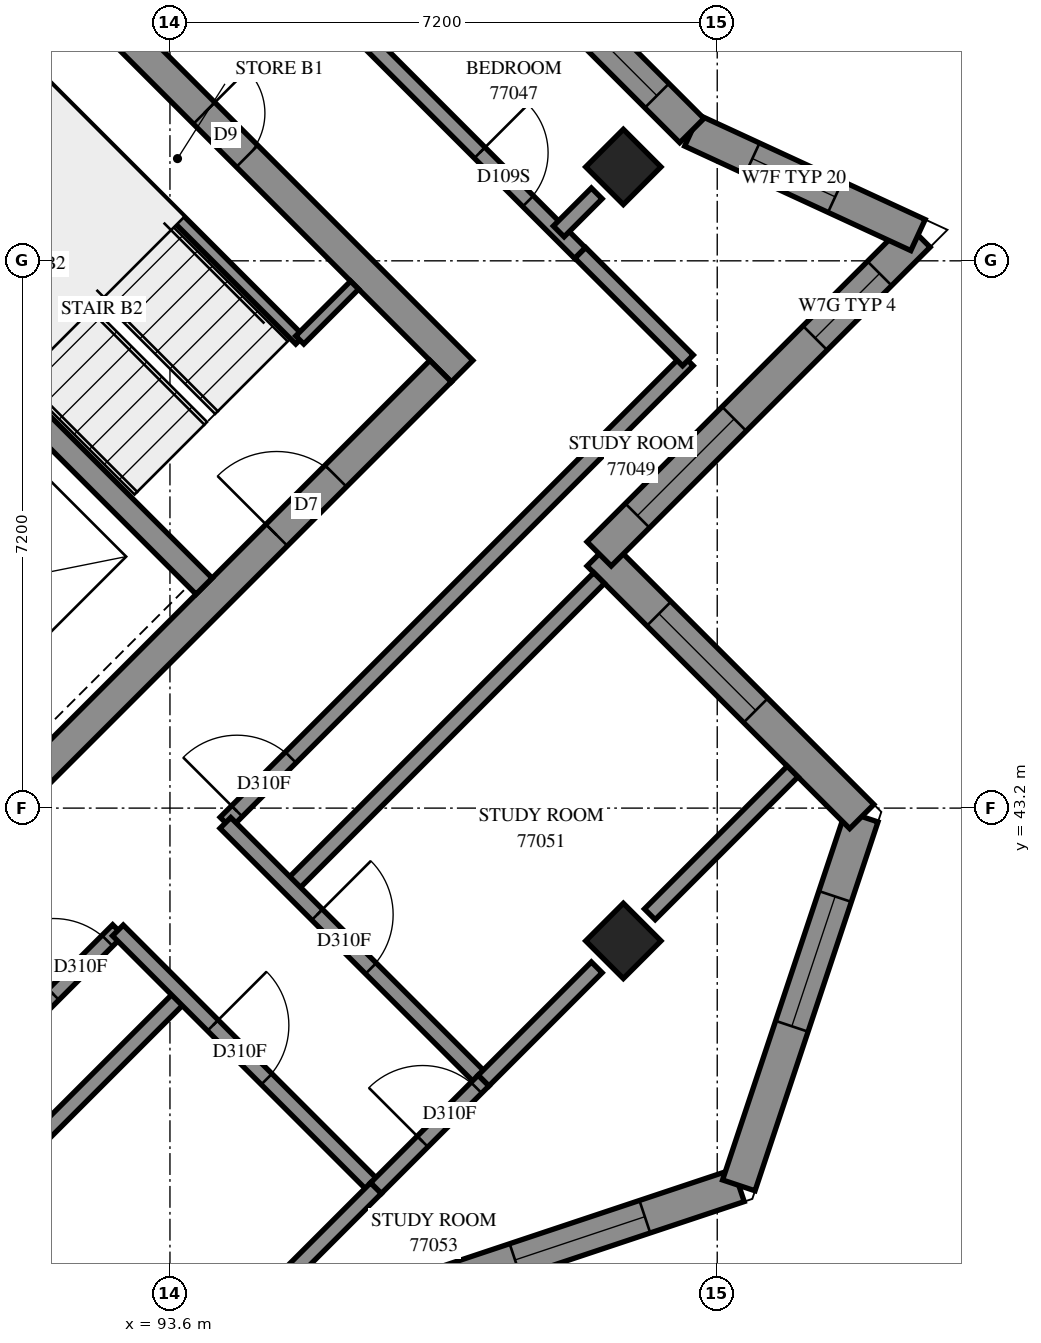
"""IFC4 building model, lengths in metres.
Left out: names, types, materials, properties, quantities, classifications, styles, units other than length and angle.
Written with IfcOpenShell. Run it as: python <this file> out.ifc"""

import sys

from ifc_helpers import new_model, si_unit, direction, frame, frame_2d, origin, origin_2d, place, context, subcontext, project, spatial, polyline, rectangle, outline, extrude, element, fill, save


model = new_model("IFC4")
c1 = context("Model", 3, precision=1e-05, world=origin(), true_north=direction((0.0, 1.0)))
c2 = subcontext(c1, "Body", "Model", "MODEL_VIEW")
j1 = project(units=[si_unit("LENGTHUNIT", "METRE"), si_unit("PLANEANGLEUNIT", "RADIAN")], contexts=[c1])
p1 = place(None, origin())
s1 = spatial("IfcSite", under=j1, at=p1, CompositionType="ELEMENT")
p2 = place(p1, origin())
s2 = spatial("IfcBuilding", under=s1, at=p2, CompositionType="ELEMENT")
p3 = place(p2, frame((0.0, 0.0, 281.2)))
s3 = spatial("IfcBuildingStorey", under=s2, at=p3, CompositionType="ELEMENT", Elevation=281.2)
for number, where, z_axis, x_axis in (
    (1, (99.565, 51.635, 0.0), (0.0, 0.0, 1.0), (0.707, -0.707, 0.0)),
    (2, (99.565, 41.453, 0.0), (0.0, 0.0, 1.0), (0.707, -0.707, 0.0)),
):
    element("IfcColumn", number, at=place(p3, frame(where, z_axis=z_axis, x_axis=x_axis)), inside=s3, PredefinedType="COLUMN", context=c2, shape_type="SweptSolid", body=[
        extrude(rectangle(XDim=0.7, YDim=0.7, at=origin_2d()), origin(), (0.0, 0.0, 1.0), 3.1),
    ])
p4 = place(p3, frame((86.695, 59.696, -0.3), z_axis=(0.0, 0.0, 1.0), x_axis=(0.7071100706, -0.7071034917, 0.0)))
e3 = element("IfcWall", 3, at=p4, inside=s3, PredefinedType="SHEAR", context=c2, shape_type="SweptSolid", body=[
    extrude(rectangle(XDim=15.2, YDim=0.4, at=frame_2d((7.6, 0.0))), origin(), (0.0, 0.0, 1.0), 2.7),
])
p5 = place(p4, frame((10.4, 0.0, 0.3)))
e4 = element("IfcOpeningElement", 4, at=p5, cuts=e3, PredefinedType="OPENING", context=c2, shape_type="SweptSolid", body=[
    extrude(rectangle(XDim=0.8, YDim=2.1, at=frame_2d((0.4, 1.05))), frame((0.0, 0.21, 0.0), z_axis=(0.0, -1.0, 0.0), x_axis=(1.0, 0.0, 0.0)), (0.0, 0.0, 1.0), 0.42),
])
p6 = place(p3, frame((86.978, 38.766, -0.3), z_axis=(0.0, 0.0, 1.0), x_axis=(0.7071067812, 0.7071067812, 0.0)))
e5 = element("IfcWall", 5, at=p6, inside=s3, PredefinedType="SHEAR", context=c2, shape_type="SweptSolid", body=[
    extrude(rectangle(XDim=14.4, YDim=0.4, at=frame_2d((7.2, 0.0))), origin(), (0.0, 0.0, 1.0), 2.7),
])
p7 = place(p6, frame((4.55, 0.0, 0.3)))
e6 = element("IfcOpeningElement", 6, at=p7, cuts=e5, PredefinedType="OPENING", context=c2, shape_type="SweptSolid", body=[
    extrude(rectangle(XDim=1.1, YDim=2.1, at=frame_2d((0.55, 1.05))), frame((0.0, 0.21, 0.0), z_axis=(0.0, -1.0, 0.0), x_axis=(1.0, 0.0, 0.0)), (0.0, 0.0, 1.0), 0.42),
])
p8 = place(p6, frame((11.35, 0.0, 0.3)))
e7 = element("IfcOpeningElement", 7, at=p8, cuts=e5, PredefinedType="OPENING", context=c2, shape_type="SweptSolid", body=[
    extrude(rectangle(XDim=1.1, YDim=2.1, at=frame_2d((0.55, 1.05))), frame((0.0, 0.21, 0.0), z_axis=(0.0, -1.0, 0.0), x_axis=(1.0, 0.0, 0.0)), (0.0, 0.0, 1.0), 0.42),
])
p9 = place(p3, frame((88.958, 51.211, 0.0), z_axis=(0.0, 0.0, 1.0), x_axis=(0.7070998367, -0.7071137256, 0.0)))
e8 = element("IfcWall", 8, at=p9, inside=s3, PredefinedType="SOLIDWALL", context=c2, shape_type="SweptSolid", body=[
    extrude(rectangle(XDim=7.2, YDim=0.3, at=frame_2d((3.6, 0.0))), origin(), (0.0, 0.0, 1.0), 3.1),
])
p10 = place(p3, frame((96.049, 36.559, 0.0), z_axis=(0.0, 0.0, 1.0), x_axis=(0.9486870665, 0.3162164604, 0.0)))
e9 = element("IfcWall", 9, at=p10, inside=s3, PredefinedType="SOLIDWALL", context=c2, shape_type="SweptSolid", body=[
    extrude(outline(polyline([(0.053, -0.225), (5.42, -0.225), (5.195, 0.225), (-0.053, 0.225), (0.053, -0.225)])), origin(), (0.0, 0.0, 1.0), 2.6),
])
p11 = place(p10, frame((2.204, 0.0, 0.6)))
e10 = element("IfcOpeningElement", 10, at=p11, cuts=e9, PredefinedType="OPENING", context=c2, shape_type="SweptSolid", body=[
    extrude(rectangle(XDim=1.8, YDim=1.9, at=frame_2d((0.9, 0.95))), frame((0.0, 0.235, 0.0), z_axis=(0.0, -1.0, 0.0), x_axis=(1.0, 0.0, 0.0)), (0.0, 0.0, 1.0), 0.47),
])
p12 = place(p3, frame((101.084, 38.237, 0.0), z_axis=(0.0, 0.0, 1.0), x_axis=(0.3162453612, 0.9486774328, 0.0)))
e11 = element("IfcWall", 11, at=p12, inside=s3, PredefinedType="SOLIDWALL", context=c2, shape_type="SweptSolid", body=[
    extrude(outline(polyline([(-0.113, -0.225), (5.254, -0.225), (4.976, 0.225), (0.113, 0.225), (-0.113, -0.225)])), origin(), (0.0, 0.0, 1.0), 2.6),
])
p13 = place(p12, frame((2.207, 0.0, 0.6)))
e12 = element("IfcOpeningElement", 12, at=p13, cuts=e11, PredefinedType="OPENING", context=c2, shape_type="SweptSolid", body=[
    extrude(rectangle(XDim=1.8, YDim=1.9, at=frame_2d((0.9, 0.95))), frame((0.0, 0.235, 0.0), z_axis=(0.0, -1.0, 0.0), x_axis=(1.0, 0.0, 0.0)), (0.0, 0.0, 1.0), 0.47),
])
p14 = place(p3, frame((102.701, 43.089, 0.0), z_axis=(0.0, 0.0, 1.0), x_axis=(-0.7070965479, 0.7071170144, 0.0)))
e13 = element("IfcWall", 13, at=p14, inside=s3, PredefinedType="SOLIDWALL", context=c2, shape_type="SweptSolid", body=[
    extrude(outline(polyline([(-0.139, -0.225), (4.661, -0.225), (5.111, 0.225), (0.139, 0.225), (-0.139, -0.225)])), origin(), (0.0, 0.0, 1.0), 3.1),
])
p15 = place(p14, frame((1.974, 0.0, 0.6)))
e14 = element("IfcOpeningElement", 14, at=p15, cuts=e13, PredefinedType="OPENING", context=c2, shape_type="SweptSolid", body=[
    extrude(rectangle(XDim=1.8, YDim=1.9, at=frame_2d((0.9, 0.95))), frame((0.0, 0.235, 0.0), z_axis=(0.0, -1.0, 0.0), x_axis=(1.0, 0.0, 0.0)), (0.0, 0.0, 1.0), 0.47),
])
p16 = place(p3, frame((99.246, 46.544, 0.0), z_axis=(0.0, 0.0, 1.0), x_axis=(0.7071067812, 0.7071067812, 0.0)))
e15 = element("IfcWall", 15, at=p16, inside=s3, PredefinedType="SOLIDWALL", context=c2, shape_type="SweptSolid", body=[
    extrude(outline(polyline([(0.225, -0.225), (6.255, -0.225), (5.61, 0.225), (-0.225, 0.225), (0.225, -0.225)])), origin(), (0.0, 0.0, 1.0), 3.1),
])
p17 = place(p16, frame((0.713, 0.0, 0.6)))
e16 = element("IfcOpeningElement", 16, at=p17, cuts=e15, PredefinedType="OPENING", context=c2, shape_type="SweptSolid", body=[
    extrude(rectangle(XDim=1.8, YDim=1.9, at=frame_2d((0.9, 0.95))), frame((0.0, 0.235, 0.0), z_axis=(0.0, -1.0, 0.0), x_axis=(1.0, 0.0, 0.0)), (0.0, 0.0, 1.0), 0.47),
])
p18 = place(p16, frame((4.017, 0.0, 0.6)))
e17 = element("IfcOpeningElement", 17, at=p18, cuts=e15, PredefinedType="OPENING", context=c2, shape_type="SweptSolid", body=[
    extrude(rectangle(XDim=1.2, YDim=1.9, at=frame_2d((0.6, 0.95))), frame((0.0, 0.235, 0.0), z_axis=(0.0, -1.0, 0.0), x_axis=(1.0, 0.0, 0.0)), (0.0, 0.0, 1.0), 0.47),
])
p19 = place(p3, frame((103.441, 50.739, 0.0), z_axis=(0.0, 0.0, 1.0), x_axis=(-0.9078548817, 0.419284526, 0.0)))
e18 = element("IfcWall", 18, at=p19, inside=s3, PredefinedType="SOLIDWALL", context=c2, shape_type="SweptSolid", body=[
    extrude(outline(polyline([(-0.323, -0.225), (3.238, -0.225), (3.318, 0.225), (0.323, 0.225), (-0.323, -0.225)])), origin(), (0.0, 0.0, 1.0), 3.1),
])
p20 = place(p19, frame((1.2, 0.0, 0.45)))
e19 = element("IfcOpeningElement", 19, at=p20, cuts=e18, PredefinedType="OPENING", context=c2, shape_type="SweptSolid", body=[
    extrude(rectangle(XDim=1.2, YDim=2.55, at=frame_2d((0.6, 1.275))), frame((0.0, 0.235, 0.0), z_axis=(0.0, -1.0, 0.0), x_axis=(1.0, 0.0, 0.0)), (0.0, 0.0, 1.0), 0.47),
])
p21 = place(p3, frame((100.466, 52.113, 0.0), z_axis=(0.0, 0.0, 1.0), x_axis=(-0.7071067812, 0.7071067812, 0.0)))
e20 = element("IfcWall", 20, at=p21, inside=s3, PredefinedType="SOLIDWALL", context=c2, shape_type="SweptSolid", body=[
    extrude(outline(polyline([(0.04, -0.225), (6.722, -0.225), (6.722, 0.225), (-0.04, 0.225), (0.04, -0.225)])), origin(), (0.0, 0.0, 1.0), 3.1),
])
p22 = place(p21, frame((0.649, 0.0, 0.45)))
e21 = element("IfcOpeningElement", 21, at=p22, cuts=e20, PredefinedType="OPENING", context=c2, shape_type="SweptSolid", body=[
    extrude(rectangle(XDim=2.8, YDim=2.55, at=frame_2d((1.4, 1.275))), frame((0.0, 0.235, 0.0), z_axis=(0.0, -1.0, 0.0), x_axis=(1.0, 0.0, 0.0)), (0.0, 0.0, 1.0), 0.47),
])
p23 = place(p21, frame((4.911, 0.0, 0.45)))
e22 = element("IfcOpeningElement", 22, at=p23, cuts=e20, PredefinedType="OPENING", context=c2, shape_type="SweptSolid", body=[
    extrude(rectangle(XDim=1.2, YDim=2.55, at=frame_2d((0.6, 1.275))), frame((0.0, 0.235, 0.0), z_axis=(0.0, -1.0, 0.0), x_axis=(1.0, 0.0, 0.0)), (0.0, 0.0, 1.0), 0.47),
])
p24 = place(p3, frame((91.313, 53.354, 0.0), z_axis=(0.0, 0.0, 1.0), x_axis=(0.7071067812, -0.7071067812, 0.0)))
e23 = element("IfcWall", 23, at=p24, inside=s3, PredefinedType="PARTITIONING", context=c2, shape_type="SweptSolid", body=[
    extrude(rectangle(XDim=5.65, YDim=0.15, at=frame_2d((2.825, 0.0))), origin(), (0.0, 0.0, 1.0), 3.1),
])
p25 = place(p3, frame((95.308, 49.358, 0.0), z_axis=(0.0, 0.0, 1.0), x_axis=(0.70705776, 0.707155799, 0.0)))
e24 = element("IfcWall", 24, at=p25, inside=s3, PredefinedType="PARTITIONING", context=c2, shape_type="SweptSolid", body=[
    extrude(rectangle(XDim=1.02, YDim=0.15, at=frame_2d((0.51, 0.0))), origin(), (0.0, 0.0, 1.0), 3.1),
])
p26 = place(p3, frame((86.306, 33.287, 0.0), z_axis=(0.0, 0.0, 1.0), x_axis=(0.7071020418, 0.7071115206, 0.0)))
e25 = element("IfcWall", 25, at=p26, inside=s3, PredefinedType="PARTITIONING", context=c2, shape_type="SweptSolid", body=[
    extrude(rectangle(XDim=10.55, YDim=0.2, at=frame_2d((5.275, 0.0))), origin(), (0.0, 0.0, 1.0), 3.1),
])
p27 = place(p3, frame((94.331, 43.009, 0.0), z_axis=(0.0, 0.0, 1.0), x_axis=(0.7071067812, 0.7071067812, 0.0)))
e26 = element("IfcWall", 26, at=p27, inside=s3, PredefinedType="PARTITIONING", context=c2, shape_type="SweptSolid", body=[
    extrude(rectangle(XDim=8.601, YDim=0.2, at=frame_2d((4.301, 0.0))), origin(), (0.0, 0.0, 1.0), 3.1),
])
p28 = place(p27, frame((0.212, 0.0, 0.0)))
e27 = element("IfcOpeningElement", 27, at=p28, cuts=e26, PredefinedType="OPENING", context=c2, shape_type="SweptSolid", body=[
    extrude(rectangle(XDim=1.0, YDim=2.1, at=frame_2d((0.5, 1.05))), frame((0.0, 0.11, 0.0), z_axis=(0.0, -1.0, 0.0), x_axis=(1.0, 0.0, 0.0)), (0.0, 0.0, 1.0), 0.22),
])
p29 = place(p3, frame((86.837, 35.515, 0.0), z_axis=(0.0, 0.0, 1.0), x_axis=(0.7071067812, 0.7071067812, 0.0)))
e28 = element("IfcWall", 28, at=p29, inside=s3, PredefinedType="PARTITIONING", context=c2, shape_type="SweptSolid", body=[
    extrude(rectangle(XDim=8.598, YDim=0.2, at=frame_2d((4.299, 0.0))), origin(), (0.0, 0.0, 1.0), 3.1),
])
p30 = place(p29, frame((7.4, 0.0, 0.0)))
e29 = element("IfcOpeningElement", 29, at=p30, cuts=e28, PredefinedType="OPENING", context=c2, shape_type="SweptSolid", body=[
    extrude(rectangle(XDim=1.0, YDim=2.1, at=frame_2d((0.5, 1.05))), frame((0.0, 0.11, 0.0), z_axis=(0.0, -1.0, 0.0), x_axis=(1.0, 0.0, 0.0)), (0.0, 0.0, 1.0), 0.22),
])
p31 = place(p3, frame((95.179, 42.161, 0.0), z_axis=(0.0, 0.0, 1.0), x_axis=(0.707115476, 0.7070980863, 0.0)))
e30 = element("IfcWall", 30, at=p31, inside=s3, PredefinedType="PARTITIONING", context=c2, shape_type="SweptSolid", body=[
    extrude(rectangle(XDim=5.75, YDim=0.2, at=frame_2d((2.875, 0.0))), origin(), (0.0, 0.0, 1.0), 3.1),
])
p32 = place(p3, frame((95.531, 53.965, 0.0), z_axis=(0.0, 0.0, 1.0), x_axis=(0.7071067812, -0.7071067812, 0.0)))
e31 = element("IfcWall", 31, at=p32, inside=s3, PredefinedType="PARTITIONING", context=c2, shape_type="SweptSolid", body=[
    extrude(rectangle(XDim=4.899, YDim=0.2, at=frame_2d((2.449, 0.0))), origin(), (0.0, 0.0, 1.0), 3.1),
])
p33 = place(p32, frame((3.031, 0.0, 0.0)))
e32 = element("IfcOpeningElement", 32, at=p33, cuts=e31, PredefinedType="OPENING", context=c2, shape_type="SweptSolid", body=[
    extrude(rectangle(XDim=0.9, YDim=2.1, at=frame_2d((0.45, 1.05))), frame((0.0, 0.11, 0.0), z_axis=(0.0, -1.0, 0.0), x_axis=(1.0, 0.0, 0.0)), (0.0, 0.0, 1.0), 0.22),
])
p34 = place(p3, frame((92.915, 41.591, 0.0), z_axis=(0.0, 0.0, 1.0), x_axis=(0.7071067812, -0.7071067812, 0.0)))
e33 = element("IfcWall", 33, at=p34, inside=s3, PredefinedType="PARTITIONING", context=c2, shape_type="SweptSolid", body=[
    extrude(rectangle(XDim=4.8, YDim=0.2, at=frame_2d((2.4, 0.0))), origin(), (0.0, 0.0, 1.0), 3.1),
])
p35 = place(p34, frame((1.767, 0.0, 0.0)))
e34 = element("IfcOpeningElement", 34, at=p35, cuts=e33, PredefinedType="OPENING", context=c2, shape_type="SweptSolid", body=[
    extrude(rectangle(XDim=1.0, YDim=2.1, at=frame_2d((0.5, 1.05))), frame((0.0, 0.11, 0.0), z_axis=(0.0, -1.0, 0.0), x_axis=(1.0, 0.0, 0.0)), (0.0, 0.0, 1.0), 0.22),
])
p36 = place(p3, frame((94.329, 43.005, 0.0), z_axis=(0.0, 0.0, 1.0), x_axis=(0.7071067812, -0.7071067812, 0.0)))
e35 = element("IfcWall", 35, at=p36, inside=s3, PredefinedType="PARTITIONING", context=c2, shape_type="SweptSolid", body=[
    extrude(rectangle(XDim=4.8, YDim=0.2, at=frame_2d((2.4, 0.0))), origin(), (0.0, 0.0, 1.0), 3.1),
])
p37 = place(p36, frame((1.707, 0.0, 0.0)))
e36 = element("IfcOpeningElement", 36, at=p37, cuts=e35, PredefinedType="OPENING", context=c2, shape_type="SweptSolid", body=[
    extrude(rectangle(XDim=1.0, YDim=2.1, at=frame_2d((0.5, 1.05))), frame((0.0, 0.11, 0.0), z_axis=(0.0, -1.0, 0.0), x_axis=(1.0, 0.0, 0.0)), (0.0, 0.0, 1.0), 0.22),
])
p38 = place(p3, frame((99.913, 41.803, 0.0), z_axis=(0.0, 0.0, 1.0), x_axis=(0.7071067812, 0.7071067812, 0.0)))
e37 = element("IfcWall", 37, at=p38, inside=s3, PredefinedType="PARTITIONING", context=c2, shape_type="SweptSolid", body=[
    extrude(rectangle(XDim=2.656, YDim=0.2, at=frame_2d((1.328, 0.0))), origin(), (0.0, 0.0, 1.0), 2.6),
])
p39 = place(p3, frame((97.725, 39.615, 0.0), z_axis=(0.0, 0.0, 1.0), x_axis=(0.7071067812, 0.7071067812, 0.0)))
e38 = element("IfcWall", 38, at=p39, inside=s3, PredefinedType="PARTITIONING", context=c2, shape_type="SweptSolid", body=[
    extrude(rectangle(XDim=2.107, YDim=0.2, at=frame_2d((1.054, 0.0))), origin(), (0.0, 0.0, 1.0), 2.6),
])
p40 = place(p3, frame((94.823, 36.713, 0.0), z_axis=(0.0, 0.0, 1.0), x_axis=(0.7071067812, 0.7071067812, 0.0)))
e39 = element("IfcWall", 39, at=p40, inside=s3, PredefinedType="PARTITIONING", context=c2, shape_type="SweptSolid", body=[
    extrude(rectangle(XDim=2.104, YDim=0.2, at=frame_2d((1.052, 0.0))), origin(), (0.0, 0.0, 1.0), 2.6),
])
p41 = place(p3, frame((98.998, 50.504, 0.0), z_axis=(0.0, 0.0, 1.0), x_axis=(0.7076063266, -0.7066068826, 0.0)))
e40 = element("IfcWall", 40, at=p41, inside=s3, PredefinedType="PARTITIONING", context=c2, shape_type="SweptSolid", body=[
    extrude(rectangle(XDim=2.001, YDim=0.2, at=frame_2d((1.001, 0.0))), origin(), (0.0, 0.0, 1.0), 3.1),
])
p42 = place(p3, frame((96.311, 38.201, 0.0), z_axis=(0.0, 0.0, 1.0), x_axis=(0.7071067812, 0.7071067812, 0.0)))
e41 = element("IfcWall", 41, at=p42, inside=s3, PredefinedType="PARTITIONING", context=c2, shape_type="SweptSolid", body=[
    extrude(rectangle(XDim=2.0, YDim=0.2, at=frame_2d((1.0, 0.0))), origin(), (0.0, 0.0, 1.0), 2.6),
])
p43 = place(p42, frame((0.866, 0.0, 0.0)))
e42 = element("IfcOpeningElement", 42, at=p43, cuts=e41, PredefinedType="OPENING", context=c2, shape_type="SweptSolid", body=[
    extrude(rectangle(XDim=1.0, YDim=2.1, at=frame_2d((0.5, 1.05))), frame((0.0, 0.11, 0.0), z_axis=(0.0, -1.0, 0.0), x_axis=(1.0, 0.0, 0.0)), (0.0, 0.0, 1.0), 0.22),
])
p44 = place(p3, frame((98.715, 50.787, 0.0), z_axis=(0.0, 0.0, 1.0), x_axis=(0.7071067812, 0.7071067812, 0.0)))
e43 = element("IfcWall", 43, at=p44, inside=s3, PredefinedType="PARTITIONING", context=c2, shape_type="SweptSolid", body=[
    extrude(rectangle(XDim=0.707, YDim=0.2, at=frame_2d((0.353, 0.0))), origin(), (0.0, 0.0, 1.0), 3.1),
])
p45 = place(p11, origin())
e44 = element("IfcWindow", 44, at=p45, inside=s3, PartitioningType="SINGLE_PANEL", PredefinedType="WINDOW", context=c2, shape_type="SweptSolid", body=[
    extrude(rectangle(XDim=1.8, YDim=1.9, at=frame_2d((0.9, 0.95))), frame((0.0, 0.205, 0.0), z_axis=(0.0, -1.0, 0.0), x_axis=(1.0, 0.0, 0.0)), (0.0, 0.0, 1.0), 0.06),
])
fill(e10, e44)
p46 = place(p13, origin())
e45 = element("IfcWindow", 45, at=p46, inside=s3, PartitioningType="SINGLE_PANEL", PredefinedType="WINDOW", context=c2, shape_type="SweptSolid", body=[
    extrude(rectangle(XDim=1.8, YDim=1.9, at=frame_2d((0.9, 0.95))), frame((0.0, 0.205, 0.0), z_axis=(0.0, -1.0, 0.0), x_axis=(1.0, 0.0, 0.0)), (0.0, 0.0, 1.0), 0.06),
])
fill(e12, e45)
p47 = place(p15, origin())
e46 = element("IfcWindow", 46, at=p47, inside=s3, PartitioningType="SINGLE_PANEL", PredefinedType="WINDOW", context=c2, shape_type="SweptSolid", body=[
    extrude(rectangle(XDim=1.8, YDim=1.9, at=frame_2d((0.9, 0.95))), frame((0.0, 0.205, 0.0), z_axis=(0.0, -1.0, 0.0), x_axis=(1.0, 0.0, 0.0)), (0.0, 0.0, 1.0), 0.06),
])
fill(e14, e46)
p48 = place(p17, origin())
e47 = element("IfcWindow", 47, at=p48, inside=s3, PartitioningType="SINGLE_PANEL", PredefinedType="WINDOW", context=c2, shape_type="SweptSolid", body=[
    extrude(rectangle(XDim=1.8, YDim=1.9, at=frame_2d((0.9, 0.95))), frame((0.0, 0.205, 0.0), z_axis=(0.0, -1.0, 0.0), x_axis=(1.0, 0.0, 0.0)), (0.0, 0.0, 1.0), 0.06),
])
fill(e16, e47)
p49 = place(p18, origin())
e48 = element("IfcWindow", 48, at=p49, inside=s3, PartitioningType="SINGLE_PANEL", PredefinedType="WINDOW", context=c2, shape_type="SweptSolid", body=[
    extrude(rectangle(XDim=1.2, YDim=1.9, at=frame_2d((0.6, 0.95))), frame((0.0, 0.205, 0.0), z_axis=(0.0, -1.0, 0.0), x_axis=(1.0, 0.0, 0.0)), (0.0, 0.0, 1.0), 0.06),
])
fill(e17, e48)
p50 = place(p20, origin())
e49 = element("IfcWindow", 49, at=p50, inside=s3, PartitioningType="SINGLE_PANEL", PredefinedType="WINDOW", context=c2, shape_type="SweptSolid", body=[
    extrude(rectangle(XDim=1.2, YDim=2.55, at=frame_2d((0.6, 1.275))), frame((0.0, 0.205, 0.0), z_axis=(0.0, -1.0, 0.0), x_axis=(1.0, 0.0, 0.0)), (0.0, 0.0, 1.0), 0.06),
])
fill(e19, e49)
p51 = place(p22, origin())
e50 = element("IfcWindow", 50, at=p51, inside=s3, PartitioningType="SINGLE_PANEL", PredefinedType="WINDOW", context=c2, shape_type="SweptSolid", body=[
    extrude(rectangle(XDim=2.8, YDim=2.55, at=frame_2d((1.4, 1.275))), frame((0.0, 0.205, 0.0), z_axis=(0.0, -1.0, 0.0), x_axis=(1.0, 0.0, 0.0)), (0.0, 0.0, 1.0), 0.06),
])
fill(e21, e50)
p52 = place(p5, origin())
e51 = element("IfcDoor", 51, at=p52, inside=s3, OperationType="SINGLE_SWING_RIGHT", PredefinedType="DOOR", context=c2, shape_type="SweptSolid", body=[
    extrude(rectangle(XDim=0.8, YDim=2.1, at=frame_2d((0.4, 1.05))), frame((0.0, 0.025, 0.0), z_axis=(0.0, -1.0, 0.0), x_axis=(1.0, 0.0, 0.0)), (0.0, 0.0, 1.0), 0.05),
])
fill(e4, e51)
p53 = place(p8, origin())
e52 = element("IfcDoor", 52, at=p53, inside=s3, OperationType="SINGLE_SWING_RIGHT", PredefinedType="DOOR", context=c2, shape_type="SweptSolid", body=[
    extrude(rectangle(XDim=1.1, YDim=2.1, at=frame_2d((0.55, 1.05))), frame((0.0, 0.025, 0.0), z_axis=(0.0, -1.0, 0.0), x_axis=(1.0, 0.0, 0.0)), (0.0, 0.0, 1.0), 0.05),
])
fill(e7, e52)
p54 = place(p33, origin())
e53 = element("IfcDoor", 53, at=p54, inside=s3, OperationType="SINGLE_SWING_LEFT", PredefinedType="DOOR", context=c2, shape_type="SweptSolid", body=[
    extrude(rectangle(XDim=0.9, YDim=2.1, at=frame_2d((0.45, 1.05))), frame((0.0, 0.025, 0.0), z_axis=(0.0, -1.0, 0.0), x_axis=(1.0, 0.0, 0.0)), (0.0, 0.0, 1.0), 0.05),
])
fill(e32, e53)
p55 = place(p28, origin())
e54 = element("IfcDoor", 54, at=p55, inside=s3, OperationType="SINGLE_SWING_LEFT", PredefinedType="DOOR", context=c2, shape_type="SweptSolid", body=[
    extrude(rectangle(XDim=1.0, YDim=2.1, at=frame_2d((0.5, 1.05))), frame((0.0, 0.025, 0.0), z_axis=(0.0, -1.0, 0.0), x_axis=(1.0, 0.0, 0.0)), (0.0, 0.0, 1.0), 0.05),
])
fill(e27, e54)
p56 = place(p30, origin())
e55 = element("IfcDoor", 55, at=p56, inside=s3, OperationType="SINGLE_SWING_LEFT", PredefinedType="DOOR", context=c2, shape_type="SweptSolid", body=[
    extrude(rectangle(XDim=1.0, YDim=2.1, at=frame_2d((0.5, 1.05))), frame((0.0, 0.025, 0.0), z_axis=(0.0, -1.0, 0.0), x_axis=(1.0, 0.0, 0.0)), (0.0, 0.0, 1.0), 0.05),
])
fill(e29, e55)
p57 = place(p37, origin())
e56 = element("IfcDoor", 56, at=p57, inside=s3, OperationType="SINGLE_SWING_RIGHT", PredefinedType="DOOR", context=c2, shape_type="SweptSolid", body=[
    extrude(rectangle(XDim=1.0, YDim=2.1, at=frame_2d((0.5, 1.05))), frame((0.0, 0.025, 0.0), z_axis=(0.0, -1.0, 0.0), x_axis=(1.0, 0.0, 0.0)), (0.0, 0.0, 1.0), 0.05),
])
fill(e36, e56)
p58 = place(p35, origin())
e57 = element("IfcDoor", 57, at=p58, inside=s3, OperationType="SINGLE_SWING_LEFT", PredefinedType="DOOR", context=c2, shape_type="SweptSolid", body=[
    extrude(rectangle(XDim=1.0, YDim=2.1, at=frame_2d((0.5, 1.05))), frame((0.0, 0.025, 0.0), z_axis=(0.0, -1.0, 0.0), x_axis=(1.0, 0.0, 0.0)), (0.0, 0.0, 1.0), 0.05),
])
fill(e34, e57)
p59 = place(p43, origin())
e58 = element("IfcDoor", 58, at=p59, inside=s3, OperationType="SINGLE_SWING_RIGHT", PredefinedType="DOOR", context=c2, shape_type="SweptSolid", body=[
    extrude(rectangle(XDim=1.0, YDim=2.1, at=frame_2d((0.5, 1.05))), frame((0.0, 0.025, 0.0), z_axis=(0.0, -1.0, 0.0), x_axis=(1.0, 0.0, 0.0)), (0.0, 0.0, 1.0), 0.05),
])
fill(e42, e58)
save(model, sys.argv[1])
